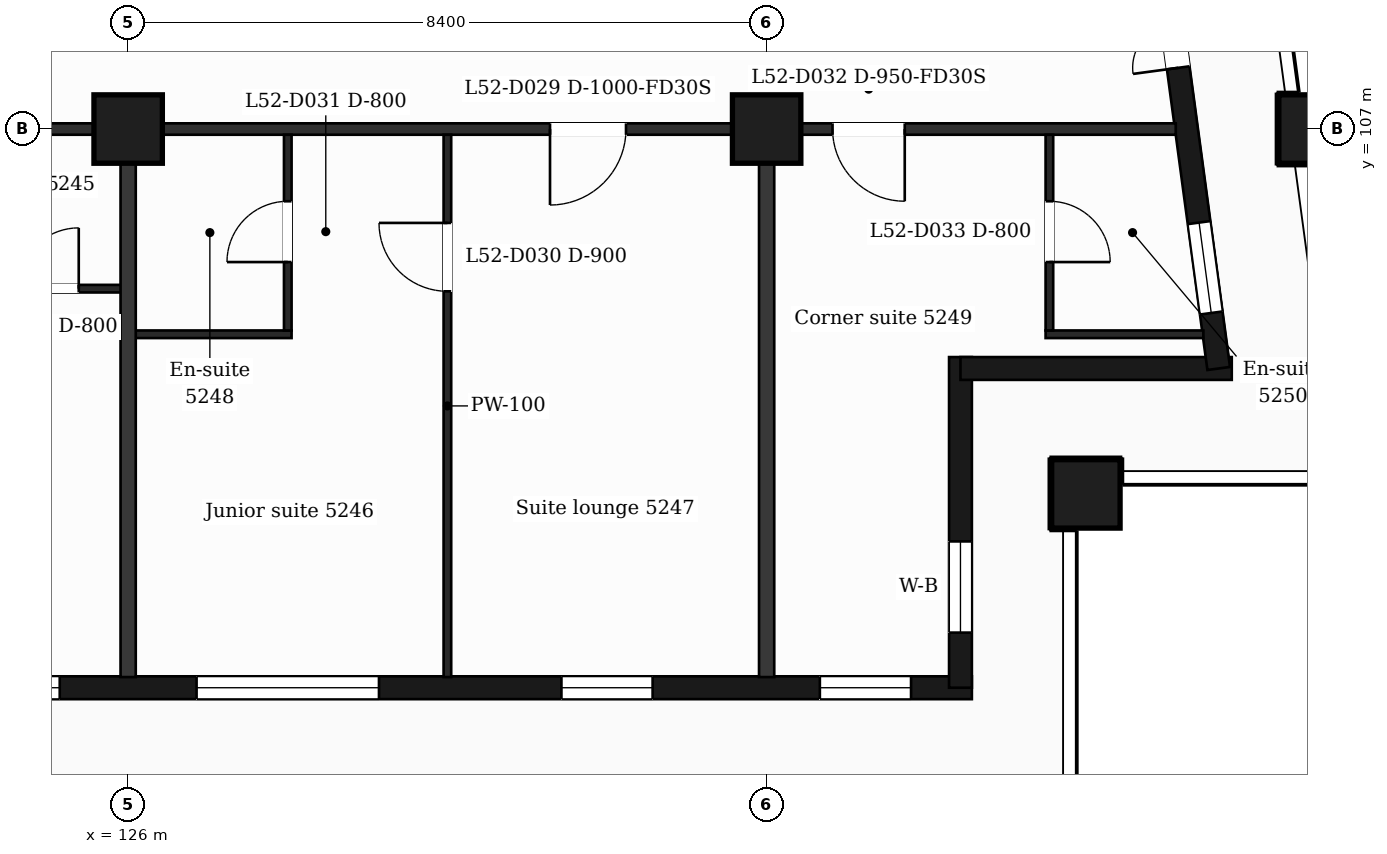
"""IFC4 building model, lengths in metres.
Left out: names, types, materials, properties, quantities, classifications, styles, units other than length and angle.
Written with IfcOpenShell. Run it as: python <this file> out.ifc"""

import sys

from ifc_helpers import new_model, si_unit, direction, frame, frame_2d, origin, origin_2d, place, context, subcontext, project, spatial, rectangle, extrude, element, fill, save


model = new_model("IFC4")
c1 = context("Model", 3, precision=1e-05, world=origin(), true_north=direction((0.0, 1.0)))
c2 = subcontext(c1, "Body", "Model", "MODEL_VIEW")
j1 = project(units=[si_unit("LENGTHUNIT", "METRE"), si_unit("PLANEANGLEUNIT", "RADIAN")], contexts=[c1])
p1 = place(None, origin())
s1 = spatial("IfcSite", under=j1, at=p1, CompositionType="ELEMENT")
p2 = place(p1, origin())
s2 = spatial("IfcBuilding", under=s1, at=p2, CompositionType="ELEMENT")
p3 = place(p2, frame((0.0, 0.0, 217.0)))
s3 = spatial("IfcBuildingStorey", under=s2, at=p3, CompositionType="ELEMENT", Elevation=217.0)
for number, where, z_axis, x_axis in (
    (1, (138.6, 102.2, 0.0), (0.0, 0.0, 1.0), (1.0, 0.0, 0.0)),
    (2, (126.0, 107.0, 0.0), (0.0, 0.0, 1.0), (1.0, 0.0, 0.0)),
    (3, (134.4, 107.0, 0.0), (0.0, 0.0, 1.0), (1.0, 0.0, 0.0)),
    (4, (141.588, 107.0, 0.0), (0.0, 0.0, 1.0), (1.0, 0.0, 0.0)),
):
    element("IfcColumn", number, at=place(p3, frame(where, z_axis=z_axis, x_axis=x_axis)), inside=s3, PredefinedType="COLUMN", context=c2, shape_type="SweptSolid", body=[
        extrude(rectangle(XDim=0.9, YDim=0.9, at=origin_2d()), origin(), (0.0, 0.0, 1.0), 3.7),
    ])
p4 = place(p3, frame((89.85, 99.65, 0.0), z_axis=(0.0, 0.0, 1.0), x_axis=(1.0, 0.0, 0.0)))
e5 = element("IfcWall", 5, at=p4, inside=s3, PredefinedType="SOLIDWALL", context=c2, shape_type="SweptSolid", body=[
    extrude(rectangle(XDim=47.25, YDim=0.3, at=frame_2d((23.625, 0.0))), origin(), (0.0, 0.0, 1.0), 3.38),
])
p5 = place(p4, frame((0.725, 0.0, 0.9)))
e6 = element("IfcOpeningElement", 6, at=p5, cuts=e5, PredefinedType="OPENING", context=c2, shape_type="SweptSolid", body=[
    extrude(rectangle(XDim=1.2, YDim=2.1, at=frame_2d((0.6, 1.05))), frame((0.0, 0.16, 0.0), z_axis=(0.0, -1.0, 0.0), x_axis=(1.0, 0.0, 0.0)), (0.0, 0.0, 1.0), 0.32),
])
p6 = place(p4, frame((3.45, 0.0, 0.9)))
e7 = element("IfcOpeningElement", 7, at=p6, cuts=e5, PredefinedType="OPENING", context=c2, shape_type="SweptSolid", body=[
    extrude(rectangle(XDim=2.4, YDim=2.1, at=frame_2d((1.2, 1.05))), frame((0.0, 0.16, 0.0), z_axis=(0.0, -1.0, 0.0), x_axis=(1.0, 0.0, 0.0)), (0.0, 0.0, 1.0), 0.32),
])
p7 = place(p4, frame((7.65, 0.0, 0.9)))
e8 = element("IfcOpeningElement", 8, at=p7, cuts=e5, PredefinedType="OPENING", context=c2, shape_type="SweptSolid", body=[
    extrude(rectangle(XDim=2.4, YDim=2.1, at=frame_2d((1.2, 1.05))), frame((0.0, 0.16, 0.0), z_axis=(0.0, -1.0, 0.0), x_axis=(1.0, 0.0, 0.0)), (0.0, 0.0, 1.0), 0.32),
])
p8 = place(p4, frame((12.45, 0.0, 0.9)))
e9 = element("IfcOpeningElement", 9, at=p8, cuts=e5, PredefinedType="OPENING", context=c2, shape_type="SweptSolid", body=[
    extrude(rectangle(XDim=1.2, YDim=2.1, at=frame_2d((0.6, 1.05))), frame((0.0, 0.16, 0.0), z_axis=(0.0, -1.0, 0.0), x_axis=(1.0, 0.0, 0.0)), (0.0, 0.0, 1.0), 0.32),
])
p9 = place(p4, frame((16.65, 0.0, 0.9)))
e10 = element("IfcOpeningElement", 10, at=p9, cuts=e5, PredefinedType="OPENING", context=c2, shape_type="SweptSolid", body=[
    extrude(rectangle(XDim=1.2, YDim=2.1, at=frame_2d((0.6, 1.05))), frame((0.0, 0.16, 0.0), z_axis=(0.0, -1.0, 0.0), x_axis=(1.0, 0.0, 0.0)), (0.0, 0.0, 1.0), 0.32),
])
p10 = place(p4, frame((19.95, 0.0, 0.0)))
e11 = element("IfcOpeningElement", 11, at=p10, cuts=e5, PredefinedType="OPENING", context=c2, shape_type="SweptSolid", body=[
    extrude(rectangle(XDim=1.2, YDim=2.4, at=frame_2d((0.6, 1.2))), frame((0.0, 0.16, 0.0), z_axis=(0.0, -1.0, 0.0), x_axis=(1.0, 0.0, 0.0)), (0.0, 0.0, 1.0), 0.32),
])
p11 = place(p4, frame((21.75, 0.0, 0.9)))
e12 = element("IfcOpeningElement", 12, at=p11, cuts=e5, PredefinedType="OPENING", context=c2, shape_type="SweptSolid", body=[
    extrude(rectangle(XDim=1.2, YDim=2.1, at=frame_2d((0.6, 1.05))), frame((0.0, 0.16, 0.0), z_axis=(0.0, -1.0, 0.0), x_axis=(1.0, 0.0, 0.0)), (0.0, 0.0, 1.0), 0.32),
])
p12 = place(p4, frame((24.45, 0.0, 0.9)))
e13 = element("IfcOpeningElement", 13, at=p12, cuts=e5, PredefinedType="OPENING", context=c2, shape_type="SweptSolid", body=[
    extrude(rectangle(XDim=2.4, YDim=2.1, at=frame_2d((1.2, 1.05))), frame((0.0, 0.16, 0.0), z_axis=(0.0, -1.0, 0.0), x_axis=(1.0, 0.0, 0.0)), (0.0, 0.0, 1.0), 0.32),
])
p13 = place(p4, frame((28.35, 0.0, 0.0)))
e14 = element("IfcOpeningElement", 14, at=p13, cuts=e5, PredefinedType="OPENING", context=c2, shape_type="SweptSolid", body=[
    extrude(rectangle(XDim=1.2, YDim=2.4, at=frame_2d((0.6, 1.2))), frame((0.0, 0.16, 0.0), z_axis=(0.0, -1.0, 0.0), x_axis=(1.0, 0.0, 0.0)), (0.0, 0.0, 1.0), 0.32),
])
p14 = place(p4, frame((30.15, 0.0, 0.9)))
e15 = element("IfcOpeningElement", 15, at=p14, cuts=e5, PredefinedType="OPENING", context=c2, shape_type="SweptSolid", body=[
    extrude(rectangle(XDim=1.2, YDim=2.1, at=frame_2d((0.6, 1.05))), frame((0.0, 0.16, 0.0), z_axis=(0.0, -1.0, 0.0), x_axis=(1.0, 0.0, 0.0)), (0.0, 0.0, 1.0), 0.32),
])
p15 = place(p4, frame((32.85, 0.0, 0.9)))
e16 = element("IfcOpeningElement", 16, at=p15, cuts=e5, PredefinedType="OPENING", context=c2, shape_type="SweptSolid", body=[
    extrude(rectangle(XDim=2.4, YDim=2.1, at=frame_2d((1.2, 1.05))), frame((0.0, 0.16, 0.0), z_axis=(0.0, -1.0, 0.0), x_axis=(1.0, 0.0, 0.0)), (0.0, 0.0, 1.0), 0.32),
])
p16 = place(p4, frame((37.05, 0.0, 0.9)))
e17 = element("IfcOpeningElement", 17, at=p16, cuts=e5, PredefinedType="OPENING", context=c2, shape_type="SweptSolid", body=[
    extrude(rectangle(XDim=2.4, YDim=2.1, at=frame_2d((1.2, 1.05))), frame((0.0, 0.16, 0.0), z_axis=(0.0, -1.0, 0.0), x_axis=(1.0, 0.0, 0.0)), (0.0, 0.0, 1.0), 0.32),
])
p17 = place(p4, frame((41.85, 0.0, 0.9)))
e18 = element("IfcOpeningElement", 18, at=p17, cuts=e5, PredefinedType="OPENING", context=c2, shape_type="SweptSolid", body=[
    extrude(rectangle(XDim=1.2, YDim=2.1, at=frame_2d((0.6, 1.05))), frame((0.0, 0.16, 0.0), z_axis=(0.0, -1.0, 0.0), x_axis=(1.0, 0.0, 0.0)), (0.0, 0.0, 1.0), 0.32),
])
p18 = place(p4, frame((45.25, 0.0, 0.9)))
e19 = element("IfcOpeningElement", 19, at=p18, cuts=e5, PredefinedType="OPENING", context=c2, shape_type="SweptSolid", body=[
    extrude(rectangle(XDim=1.2, YDim=2.1, at=frame_2d((0.6, 1.05))), frame((0.0, 0.16, 0.0), z_axis=(0.0, -1.0, 0.0), x_axis=(1.0, 0.0, 0.0)), (0.0, 0.0, 1.0), 0.32),
])
p19 = place(p3, frame((136.95, 99.65, 0.0), z_axis=(0.0, 0.0, 1.0), x_axis=(0.0, 1.0, 0.0)))
e20 = element("IfcWall", 20, at=p19, inside=s3, PredefinedType="SOLIDWALL", context=c2, shape_type="SweptSolid", body=[
    extrude(rectangle(XDim=4.35, YDim=0.3, at=frame_2d((2.175, 0.0))), origin(), (0.0, 0.0, 1.0), 3.38),
])
p20 = place(p19, frame((0.725, 0.0, 0.9)))
e21 = element("IfcOpeningElement", 21, at=p20, cuts=e20, PredefinedType="OPENING", context=c2, shape_type="SweptSolid", body=[
    extrude(rectangle(XDim=1.2, YDim=2.1, at=frame_2d((0.6, 1.05))), frame((0.0, 0.16, 0.0), z_axis=(0.0, -1.0, 0.0), x_axis=(1.0, 0.0, 0.0)), (0.0, 0.0, 1.0), 0.32),
])
p21 = place(p3, frame((136.95, 103.85, 0.0), z_axis=(0.0, 0.0, 1.0), x_axis=(1.0, 0.0, 0.0)))
e22 = element("IfcWall", 22, at=p21, inside=s3, PredefinedType="SOLIDWALL", context=c2, shape_type="SweptSolid", body=[
    extrude(rectangle(XDim=3.569, YDim=0.3, at=frame_2d((1.785, 0.0))), origin(), (0.0, 0.0, 1.0), 3.38),
])
p22 = place(p3, frame((140.348, 103.85, 0.0), z_axis=(0.0, 0.0, 1.0), x_axis=(-0.133431549479, 0.991058031401, 0.0)))
e23 = element("IfcWall", 23, at=p22, inside=s3, PredefinedType="SOLIDWALL", context=c2, shape_type="SweptSolid", body=[
    extrude(rectangle(XDim=6.609, YDim=0.3, at=frame_2d((3.304, 0.0))), origin(), (0.0, 0.0, 1.0), 3.38),
])
p23 = place(p22, frame((0.737, 0.0, 0.9)))
e24 = element("IfcOpeningElement", 24, at=p23, cuts=e23, PredefinedType="OPENING", context=c2, shape_type="SweptSolid", body=[
    extrude(rectangle(XDim=1.2, YDim=2.1, at=frame_2d((0.6, 1.05))), frame((0.0, 0.16, 0.0), z_axis=(0.0, -1.0, 0.0), x_axis=(1.0, 0.0, 0.0)), (0.0, 0.0, 1.0), 0.32),
])
p24 = place(p22, frame((3.991, 0.0, 0.0)))
e25 = element("IfcOpeningElement", 25, at=p24, cuts=e23, PredefinedType="OPENING", context=c2, shape_type="SweptSolid", body=[
    extrude(rectangle(XDim=1.2, YDim=2.4, at=frame_2d((0.6, 1.2))), frame((0.0, 0.16, 0.0), z_axis=(0.0, -1.0, 0.0), x_axis=(1.0, 0.0, 0.0)), (0.0, 0.0, 1.0), 0.32),
])
p25 = place(p3, frame((126.0, 104.3, 0.0), z_axis=(0.0, 0.0, 1.0), x_axis=(1.0, 0.0, 0.0)))
e26 = element("IfcWall", 26, at=p25, inside=s3, PredefinedType="PARTITIONING", context=c2, shape_type="SweptSolid", body=[
    extrude(rectangle(XDim=2.15, YDim=0.1, at=frame_2d((1.075, 0.0))), origin(), (0.0, 0.0, 1.0), 3.38),
])
p26 = place(p3, frame((138.07, 104.3, 0.0), z_axis=(0.0, 0.0, 1.0), x_axis=(1.0, 0.0, 0.0)))
e27 = element("IfcWall", 27, at=p26, inside=s3, PredefinedType="PARTITIONING", context=c2, shape_type="SweptSolid", body=[
    extrude(rectangle(XDim=2.076, YDim=0.1, at=frame_2d((1.038, 0.0))), origin(), (0.0, 0.0, 1.0), 3.38),
])
p27 = place(p3, frame((123.25, 104.9, 0.0), z_axis=(0.0, 0.0, 1.0), x_axis=(1.0, 0.0, 0.0)))
e28 = element("IfcWall", 28, at=p27, inside=s3, PredefinedType="PARTITIONING", context=c2, shape_type="SweptSolid", body=[
    extrude(rectangle(XDim=2.75, YDim=0.1, at=frame_2d((1.375, 0.0))), origin(), (0.0, 0.0, 1.0), 3.38),
])
p28 = place(p27, frame((1.3, 0.0, 0.0)))
e29 = element("IfcOpeningElement", 29, at=p28, cuts=e28, PredefinedType="OPENING", context=c2, shape_type="SweptSolid", body=[
    extrude(rectangle(XDim=0.8, YDim=2.1, at=frame_2d((0.4, 1.05))), frame((0.0, 0.06, 0.0), z_axis=(0.0, -1.0, 0.0), x_axis=(1.0, 0.0, 0.0)), (0.0, 0.0, 1.0), 0.12),
])
p29 = place(p3, frame((87.018, 107.0, 0.0), z_axis=(0.0, 0.0, 1.0), x_axis=(1.0, 0.0, 0.0)))
e30 = element("IfcWall", 30, at=p29, inside=s3, PredefinedType="PARTITIONING", context=c2, shape_type="SweptSolid", body=[
    extrude(rectangle(XDim=52.765, YDim=0.15, at=frame_2d((26.382, 0.0))), origin(), (0.0, 0.0, 1.0), 3.38),
])
p30 = place(p29, frame((1.276, 0.0, 0.0)))
e31 = element("IfcOpeningElement", 31, at=p30, cuts=e30, PredefinedType="OPENING", context=c2, shape_type="SweptSolid", body=[
    extrude(rectangle(XDim=0.95, YDim=2.1, at=frame_2d((0.475, 1.05))), frame((0.0, 0.085, 0.0), z_axis=(0.0, -1.0, 0.0), x_axis=(1.0, 0.0, 0.0)), (0.0, 0.0, 1.0), 0.17),
])
p31 = place(p29, frame((6.034, 0.0, 0.0)))
e32 = element("IfcOpeningElement", 32, at=p31, cuts=e30, PredefinedType="OPENING", context=c2, shape_type="SweptSolid", body=[
    extrude(rectangle(XDim=0.95, YDim=2.1, at=frame_2d((0.475, 1.05))), frame((0.0, 0.085, 0.0), z_axis=(0.0, -1.0, 0.0), x_axis=(1.0, 0.0, 0.0)), (0.0, 0.0, 1.0), 0.17),
])
p32 = place(p29, frame((15.445, 0.0, 0.0)))
e33 = element("IfcOpeningElement", 33, at=p32, cuts=e30, PredefinedType="OPENING", context=c2, shape_type="SweptSolid", body=[
    extrude(rectangle(XDim=0.95, YDim=2.1, at=frame_2d((0.475, 1.05))), frame((0.0, 0.085, 0.0), z_axis=(0.0, -1.0, 0.0), x_axis=(1.0, 0.0, 0.0)), (0.0, 0.0, 1.0), 0.17),
])
p33 = place(p29, frame((18.369, 0.0, 0.0)))
e34 = element("IfcOpeningElement", 34, at=p33, cuts=e30, PredefinedType="OPENING", context=c2, shape_type="SweptSolid", body=[
    extrude(rectangle(XDim=0.95, YDim=2.1, at=frame_2d((0.475, 1.05))), frame((0.0, 0.085, 0.0), z_axis=(0.0, -1.0, 0.0), x_axis=(1.0, 0.0, 0.0)), (0.0, 0.0, 1.0), 0.17),
])
p34 = place(p29, frame((24.519, 0.0, 0.0)))
e35 = element("IfcOpeningElement", 35, at=p34, cuts=e30, PredefinedType="OPENING", context=c2, shape_type="SweptSolid", body=[
    extrude(rectangle(XDim=0.95, YDim=2.1, at=frame_2d((0.475, 1.05))), frame((0.0, 0.085, 0.0), z_axis=(0.0, -1.0, 0.0), x_axis=(1.0, 0.0, 0.0)), (0.0, 0.0, 1.0), 0.17),
])
p35 = place(p29, frame((26.632, 0.0, 0.0)))
e36 = element("IfcOpeningElement", 36, at=p35, cuts=e30, PredefinedType="OPENING", context=c2, shape_type="SweptSolid", body=[
    extrude(rectangle(XDim=1.0, YDim=2.1, at=frame_2d((0.5, 1.05))), frame((0.0, 0.085, 0.0), z_axis=(0.0, -1.0, 0.0), x_axis=(1.0, 0.0, 0.0)), (0.0, 0.0, 1.0), 0.17),
])
p36 = place(p29, frame((33.422, 0.0, 0.0)))
e37 = element("IfcOpeningElement", 37, at=p36, cuts=e30, PredefinedType="OPENING", context=c2, shape_type="SweptSolid", body=[
    extrude(rectangle(XDim=0.95, YDim=2.1, at=frame_2d((0.475, 1.05))), frame((0.0, 0.085, 0.0), z_axis=(0.0, -1.0, 0.0), x_axis=(1.0, 0.0, 0.0)), (0.0, 0.0, 1.0), 0.17),
])
p37 = place(p29, frame((35.057, 0.0, 0.0)))
e38 = element("IfcOpeningElement", 38, at=p37, cuts=e30, PredefinedType="OPENING", context=c2, shape_type="SweptSolid", body=[
    extrude(rectangle(XDim=0.95, YDim=2.1, at=frame_2d((0.475, 1.05))), frame((0.0, 0.085, 0.0), z_axis=(0.0, -1.0, 0.0), x_axis=(1.0, 0.0, 0.0)), (0.0, 0.0, 1.0), 0.17),
])
p38 = place(p29, frame((44.532, 0.0, 0.0)))
e39 = element("IfcOpeningElement", 39, at=p38, cuts=e30, PredefinedType="OPENING", context=c2, shape_type="SweptSolid", body=[
    extrude(rectangle(XDim=1.0, YDim=2.1, at=frame_2d((0.5, 1.05))), frame((0.0, 0.085, 0.0), z_axis=(0.0, -1.0, 0.0), x_axis=(1.0, 0.0, 0.0)), (0.0, 0.0, 1.0), 0.17),
])
p39 = place(p29, frame((48.249, 0.0, 0.0)))
e40 = element("IfcOpeningElement", 40, at=p39, cuts=e30, PredefinedType="OPENING", context=c2, shape_type="SweptSolid", body=[
    extrude(rectangle(XDim=0.95, YDim=2.1, at=frame_2d((0.475, 1.05))), frame((0.0, 0.085, 0.0), z_axis=(0.0, -1.0, 0.0), x_axis=(1.0, 0.0, 0.0)), (0.0, 0.0, 1.0), 0.17),
])
p40 = place(p3, frame((126.0, 99.79, 0.0), z_axis=(0.0, 0.0, 1.0), x_axis=(0.0, 1.0, 0.0)))
e41 = element("IfcWall", 41, at=p40, inside=s3, PredefinedType="PARTITIONING", context=c2, shape_type="SweptSolid", body=[
    extrude(rectangle(XDim=7.135, YDim=0.2, at=frame_2d((3.567, 0.0))), origin(), (0.0, 0.0, 1.0), 3.38),
])
p41 = place(p3, frame((128.1, 104.35, 0.0), z_axis=(0.0, 0.0, 1.0), x_axis=(0.0, 1.0, 0.0)))
e42 = element("IfcWall", 42, at=p41, inside=s3, PredefinedType="PARTITIONING", context=c2, shape_type="SweptSolid", body=[
    extrude(rectangle(XDim=2.575, YDim=0.1, at=frame_2d((1.288, 0.0))), origin(), (0.0, 0.0, 1.0), 3.38),
])
p42 = place(p41, frame((0.9, 0.0, 0.0)))
e43 = element("IfcOpeningElement", 43, at=p42, cuts=e42, PredefinedType="OPENING", context=c2, shape_type="SweptSolid", body=[
    extrude(rectangle(XDim=0.8, YDim=2.1, at=frame_2d((0.4, 1.05))), frame((0.0, 0.06, 0.0), z_axis=(0.0, -1.0, 0.0), x_axis=(1.0, 0.0, 0.0)), (0.0, 0.0, 1.0), 0.12),
])
p43 = place(p3, frame((130.2, 99.79, 0.0), z_axis=(0.0, 0.0, 1.0), x_axis=(0.0, 1.0, 0.0)))
e44 = element("IfcWall", 44, at=p43, inside=s3, PredefinedType="PARTITIONING", context=c2, shape_type="SweptSolid", body=[
    extrude(rectangle(XDim=7.135, YDim=0.1, at=frame_2d((3.567, 0.0))), origin(), (0.0, 0.0, 1.0), 3.38),
])
p44 = place(p43, frame((5.075, 0.0, 0.0)))
e45 = element("IfcOpeningElement", 45, at=p44, cuts=e44, PredefinedType="OPENING", context=c2, shape_type="SweptSolid", body=[
    extrude(rectangle(XDim=0.9, YDim=2.1, at=frame_2d((0.45, 1.05))), frame((0.0, 0.06, 0.0), z_axis=(0.0, -1.0, 0.0), x_axis=(1.0, 0.0, 0.0)), (0.0, 0.0, 1.0), 0.12),
])
p45 = place(p3, frame((134.4, 99.79, 0.0), z_axis=(0.0, 0.0, 1.0), x_axis=(0.0, 1.0, 0.0)))
e46 = element("IfcWall", 46, at=p45, inside=s3, PredefinedType="PARTITIONING", context=c2, shape_type="SweptSolid", body=[
    extrude(rectangle(XDim=7.135, YDim=0.2, at=frame_2d((3.567, 0.0))), origin(), (0.0, 0.0, 1.0), 3.38),
])
p46 = place(p3, frame((138.12, 104.35, 0.0), z_axis=(0.0, 0.0, 1.0), x_axis=(0.0, 1.0, 0.0)))
e47 = element("IfcWall", 47, at=p46, inside=s3, PredefinedType="PARTITIONING", context=c2, shape_type="SweptSolid", body=[
    extrude(rectangle(XDim=2.575, YDim=0.1, at=frame_2d((1.288, 0.0))), origin(), (0.0, 0.0, 1.0), 3.38),
])
p47 = place(p46, frame((0.9, 0.0, 0.0)))
e48 = element("IfcOpeningElement", 48, at=p47, cuts=e47, PredefinedType="OPENING", context=c2, shape_type="SweptSolid", body=[
    extrude(rectangle(XDim=0.8, YDim=2.1, at=frame_2d((0.4, 1.05))), frame((0.0, 0.06, 0.0), z_axis=(0.0, -1.0, 0.0), x_axis=(1.0, 0.0, 0.0)), (0.0, 0.0, 1.0), 0.12),
])
p48 = place(p15, origin())
e49 = element("IfcWindow", 49, at=p48, inside=s3, PartitioningType="SINGLE_PANEL", PredefinedType="WINDOW", context=c2, shape_type="SweptSolid", body=[
    extrude(rectangle(XDim=2.4, YDim=2.1, at=frame_2d((1.2, 1.05))), frame((0.0, 0.03, 0.0), z_axis=(0.0, -1.0, 0.0), x_axis=(1.0, 0.0, 0.0)), (0.0, 0.0, 1.0), 0.06),
])
fill(e16, e49)
p49 = place(p16, origin())
e50 = element("IfcWindow", 50, at=p49, inside=s3, PartitioningType="SINGLE_PANEL", PredefinedType="WINDOW", context=c2, shape_type="SweptSolid", body=[
    extrude(rectangle(XDim=2.4, YDim=2.1, at=frame_2d((1.2, 1.05))), frame((0.0, 0.03, 0.0), z_axis=(0.0, -1.0, 0.0), x_axis=(1.0, 0.0, 0.0)), (0.0, 0.0, 1.0), 0.06),
])
fill(e17, e50)
p50 = place(p17, origin())
e51 = element("IfcWindow", 51, at=p50, inside=s3, PartitioningType="SINGLE_PANEL", PredefinedType="WINDOW", context=c2, shape_type="SweptSolid", body=[
    extrude(rectangle(XDim=1.2, YDim=2.1, at=frame_2d((0.6, 1.05))), frame((0.0, 0.03, 0.0), z_axis=(0.0, -1.0, 0.0), x_axis=(1.0, 0.0, 0.0)), (0.0, 0.0, 1.0), 0.06),
])
fill(e18, e51)
p51 = place(p18, origin())
e52 = element("IfcWindow", 52, at=p51, inside=s3, PartitioningType="SINGLE_PANEL", PredefinedType="WINDOW", context=c2, shape_type="SweptSolid", body=[
    extrude(rectangle(XDim=1.2, YDim=2.1, at=frame_2d((0.6, 1.05))), frame((0.0, 0.03, 0.0), z_axis=(0.0, -1.0, 0.0), x_axis=(1.0, 0.0, 0.0)), (0.0, 0.0, 1.0), 0.06),
])
fill(e19, e52)
p52 = place(p20, origin())
e53 = element("IfcWindow", 53, at=p52, inside=s3, PartitioningType="SINGLE_PANEL", PredefinedType="WINDOW", context=c2, shape_type="SweptSolid", body=[
    extrude(rectangle(XDim=1.2, YDim=2.1, at=frame_2d((0.6, 1.05))), frame((0.0, 0.03, 0.0), z_axis=(0.0, -1.0, 0.0), x_axis=(1.0, 0.0, 0.0)), (0.0, 0.0, 1.0), 0.06),
])
fill(e21, e53)
p53 = place(p23, origin())
e54 = element("IfcWindow", 54, at=p53, inside=s3, PartitioningType="SINGLE_PANEL", PredefinedType="WINDOW", context=c2, shape_type="SweptSolid", body=[
    extrude(rectangle(XDim=1.2, YDim=2.1, at=frame_2d((0.6, 1.05))), frame((0.0, 0.03, 0.0), z_axis=(0.0, -1.0, 0.0), x_axis=(1.0, 0.0, 0.0)), (0.0, 0.0, 1.0), 0.06),
])
fill(e24, e54)
p54 = place(p24, origin())
e55 = element("IfcDoor", 55, at=p54, inside=s3, OperationType="DOUBLE_DOOR_SINGLE_SWING", PredefinedType="DOOR", context=c2, shape_type="SweptSolid", body=[
    extrude(rectangle(XDim=1.2, YDim=2.4, at=frame_2d((0.6, 1.2))), frame((0.0, 0.025, 0.0), z_axis=(0.0, -1.0, 0.0), x_axis=(1.0, 0.0, 0.0)), (0.0, 0.0, 1.0), 0.05),
])
fill(e25, e55)
p55 = place(p28, origin())
e56 = element("IfcDoor", 56, at=p55, inside=s3, OperationType="SINGLE_SWING_RIGHT", PredefinedType="DOOR", context=c2, shape_type="SweptSolid", body=[
    extrude(rectangle(XDim=0.8, YDim=2.1, at=frame_2d((0.4, 1.05))), frame((0.0, 0.025, 0.0), z_axis=(0.0, -1.0, 0.0), x_axis=(1.0, 0.0, 0.0)), (0.0, 0.0, 1.0), 0.05),
])
fill(e29, e56)
p56 = place(p38, origin())
e57 = element("IfcDoor", 57, at=p56, inside=s3, OperationType="SINGLE_SWING_LEFT", PredefinedType="DOOR", context=c2, shape_type="SweptSolid", body=[
    extrude(rectangle(XDim=1.0, YDim=2.1, at=frame_2d((0.5, 1.05))), frame((0.0, 0.025, 0.0), z_axis=(0.0, -1.0, 0.0), x_axis=(1.0, 0.0, 0.0)), (0.0, 0.0, 1.0), 0.05),
])
fill(e39, e57)
p57 = place(p44, origin())
e58 = element("IfcDoor", 58, at=p57, inside=s3, OperationType="SINGLE_SWING_RIGHT", PredefinedType="DOOR", context=c2, shape_type="SweptSolid", body=[
    extrude(rectangle(XDim=0.9, YDim=2.1, at=frame_2d((0.45, 1.05))), frame((0.0, 0.025, 0.0), z_axis=(0.0, -1.0, 0.0), x_axis=(1.0, 0.0, 0.0)), (0.0, 0.0, 1.0), 0.05),
])
fill(e45, e58)
p58 = place(p42, origin())
e59 = element("IfcDoor", 59, at=p58, inside=s3, OperationType="SINGLE_SWING_LEFT", PredefinedType="DOOR", context=c2, shape_type="SweptSolid", body=[
    extrude(rectangle(XDim=0.8, YDim=2.1, at=frame_2d((0.4, 1.05))), frame((0.0, 0.025, 0.0), z_axis=(0.0, -1.0, 0.0), x_axis=(1.0, 0.0, 0.0)), (0.0, 0.0, 1.0), 0.05),
])
fill(e43, e59)
p59 = place(p39, origin())
e60 = element("IfcDoor", 60, at=p59, inside=s3, OperationType="SINGLE_SWING_RIGHT", PredefinedType="DOOR", context=c2, shape_type="SweptSolid", body=[
    extrude(rectangle(XDim=0.95, YDim=2.1, at=frame_2d((0.475, 1.05))), frame((0.0, 0.025, 0.0), z_axis=(0.0, -1.0, 0.0), x_axis=(1.0, 0.0, 0.0)), (0.0, 0.0, 1.0), 0.05),
])
fill(e40, e60)
p60 = place(p47, origin())
e61 = element("IfcDoor", 61, at=p60, inside=s3, OperationType="SINGLE_SWING_LEFT", PredefinedType="DOOR", context=c2, shape_type="SweptSolid", body=[
    extrude(rectangle(XDim=0.8, YDim=2.1, at=frame_2d((0.4, 1.05))), frame((0.0, 0.025, 0.0), z_axis=(0.0, -1.0, 0.0), x_axis=(1.0, 0.0, 0.0)), (0.0, 0.0, 1.0), 0.05),
])
fill(e48, e61)
save(model, sys.argv[1])
